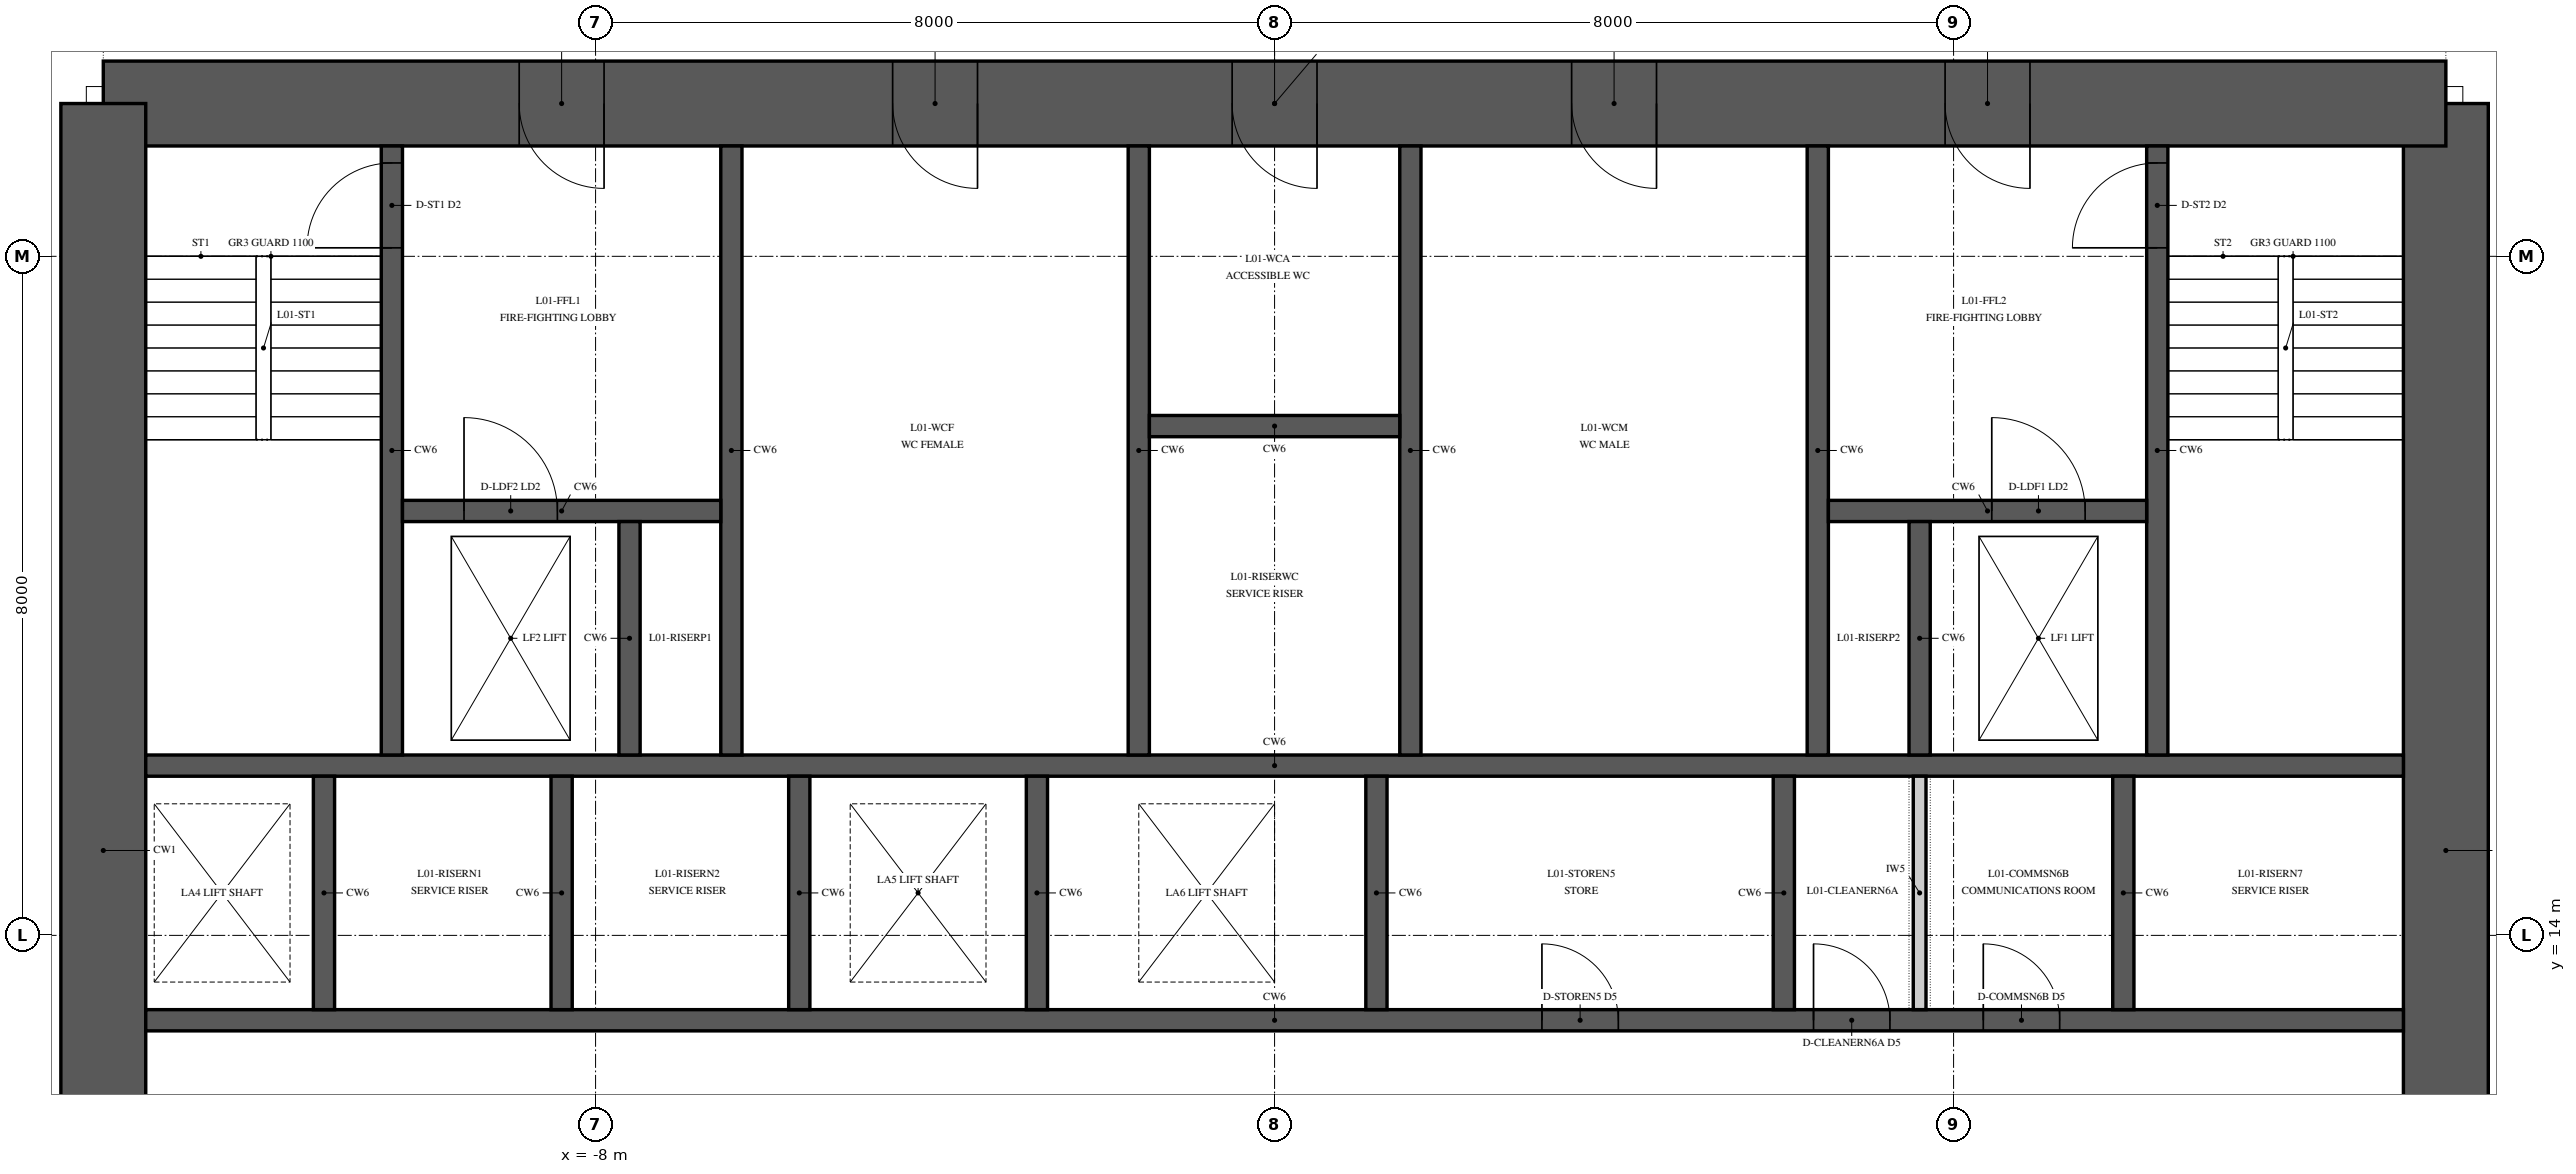
"""IFC4 building model, lengths in metres.
Left out: names, types, materials, properties, quantities, classifications, styles, units other than length and angle.
Written with IfcOpenShell. Run it as: python <this file> out.ifc"""

import sys

from ifc_helpers import new_model, si_unit, direction, frame, frame_2d, origin, place, context, subcontext, project, spatial, polyline, rectangle, outline, extrude, element, fill, save


model = new_model("IFC4")
c1 = context("Model", 3, precision=1e-05, world=origin(), true_north=direction((0.0, 1.0)))
c2 = subcontext(c1, "Body", "Model", "MODEL_VIEW")
j1 = project(units=[si_unit("LENGTHUNIT", "METRE"), si_unit("PLANEANGLEUNIT", "RADIAN")], contexts=[c1])
p1 = place(None, origin())
s1 = spatial("IfcSite", under=j1, at=p1, CompositionType="ELEMENT")
p2 = place(p1, origin())
s2 = spatial("IfcBuilding", under=s1, at=p2, CompositionType="ELEMENT")
p3 = place(p2, frame((0.0, 0.0, 6.0)))
s3 = spatial("IfcBuildingStorey", under=s2, at=p3, CompositionType="ELEMENT", Elevation=6.0)
p4 = place(p3, frame((13.8, 6.2, 0.0), z_axis=(0.0, 0.0, 1.0), x_axis=(0.0, 1.0, 0.0)))
e1 = element("IfcWall", 1, at=p4, inside=s3, PredefinedType="SHEAR", context=c2, shape_type="SweptSolid", body=[
    extrude(outline(polyline([(0.0, -0.5), (17.6, -0.5), (17.6, 0.0), (17.1, 0.0), (17.1, 0.5), (0.5, 0.5), (0.5, 0.0), (0.0, 0.0), (0.0, -0.5)])), origin(), (0.0, 0.0, 1.0), 6.0),
])
p5 = place(p4, frame((4.1, 0.0, 0.0)))
e2 = element("IfcOpeningElement", 2, at=p5, cuts=e1, PredefinedType="OPENING", context=c2, shape_type="SweptSolid", body=[
    extrude(rectangle(XDim=1.8, YDim=2.4, at=frame_2d((0.9, 1.2))), frame((0.0, 0.515, 0.0), z_axis=(0.0, -1.0, 0.0), x_axis=(1.0, 0.0, 0.0)), (0.0, 0.0, 1.0), 1.03),
])
p6 = place(p3, frame((13.8, 23.8, 0.0), z_axis=(0.0, 0.0, 1.0), x_axis=(-1.0, 0.0, 0.0)))
e3 = element("IfcWall", 3, at=p6, inside=s3, PredefinedType="SHEAR", context=c2, shape_type="SweptSolid", body=[
    extrude(rectangle(XDim=27.6, YDim=1.0, at=frame_2d((13.8, 0.0))), origin(), (0.0, 0.0, 1.0), 6.0),
])
p7 = place(p6, frame((21.7, 0.0, 0.0)))
e4 = element("IfcOpeningElement", 4, at=p7, cuts=e3, PredefinedType="OPENING", context=c2, shape_type="SweptSolid", body=[
    extrude(rectangle(XDim=1.0, YDim=2.1, at=frame_2d((0.5, 1.05))), frame((0.0, 0.515, 0.0), z_axis=(0.0, -1.0, 0.0), x_axis=(1.0, 0.0, 0.0)), (0.0, 0.0, 1.0), 1.03),
])
p8 = place(p6, frame((4.9, 0.0, 0.0)))
e5 = element("IfcOpeningElement", 5, at=p8, cuts=e3, PredefinedType="OPENING", context=c2, shape_type="SweptSolid", body=[
    extrude(rectangle(XDim=1.0, YDim=2.1, at=frame_2d((0.5, 1.05))), frame((0.0, 0.515, 0.0), z_axis=(0.0, -1.0, 0.0), x_axis=(1.0, 0.0, 0.0)), (0.0, 0.0, 1.0), 1.03),
])
p9 = place(p6, frame((17.3, 0.0, 0.0)))
e6 = element("IfcOpeningElement", 6, at=p9, cuts=e3, PredefinedType="OPENING", context=c2, shape_type="SweptSolid", body=[
    extrude(rectangle(XDim=1.0, YDim=2.1, at=frame_2d((0.5, 1.05))), frame((0.0, 0.515, 0.0), z_axis=(0.0, -1.0, 0.0), x_axis=(1.0, 0.0, 0.0)), (0.0, 0.0, 1.0), 1.03),
])
p10 = place(p6, frame((13.3, 0.0, 0.0)))
e7 = element("IfcOpeningElement", 7, at=p10, cuts=e3, PredefinedType="OPENING", context=c2, shape_type="SweptSolid", body=[
    extrude(rectangle(XDim=1.0, YDim=2.1, at=frame_2d((0.5, 1.05))), frame((0.0, 0.515, 0.0), z_axis=(0.0, -1.0, 0.0), x_axis=(1.0, 0.0, 0.0)), (0.0, 0.0, 1.0), 1.03),
])
p11 = place(p6, frame((9.3, 0.0, 0.0)))
e8 = element("IfcOpeningElement", 8, at=p11, cuts=e3, PredefinedType="OPENING", context=c2, shape_type="SweptSolid", body=[
    extrude(rectangle(XDim=1.0, YDim=2.1, at=frame_2d((0.5, 1.05))), frame((0.0, 0.515, 0.0), z_axis=(0.0, -1.0, 0.0), x_axis=(1.0, 0.0, 0.0)), (0.0, 0.0, 1.0), 1.03),
])
p12 = place(p3, frame((-13.8, 23.8, 0.0), z_axis=(0.0, 0.0, 1.0), x_axis=(0.0, -1.0, 0.0)))
e9 = element("IfcWall", 9, at=p12, inside=s3, PredefinedType="SHEAR", context=c2, shape_type="SweptSolid", body=[
    extrude(outline(polyline([(0.0, -0.5), (17.6, -0.5), (17.6, 0.0), (17.1, 0.0), (17.1, 0.5), (0.5, 0.5), (0.5, 0.0), (0.0, 0.0), (0.0, -0.5)])), origin(), (0.0, 0.0, 1.0), 6.0),
])
p13 = place(p12, frame((11.7, 0.0, 0.0)))
e10 = element("IfcOpeningElement", 10, at=p13, cuts=e9, PredefinedType="OPENING", context=c2, shape_type="SweptSolid", body=[
    extrude(rectangle(XDim=1.8, YDim=2.4, at=frame_2d((0.9, 1.2))), frame((0.0, 0.515, 0.0), z_axis=(0.0, -1.0, 0.0), x_axis=(1.0, 0.0, 0.0)), (0.0, 0.0, 1.0), 1.03),
])
p14 = place(p3, frame((-13.3, 13.0, 0.0), z_axis=(0.0, 0.0, 1.0), x_axis=(1.0, 0.0, 0.0)))
e11 = element("IfcWall", 11, at=p14, inside=s3, PredefinedType="SHEAR", context=c2, shape_type="SweptSolid", body=[
    extrude(rectangle(XDim=26.6, YDim=0.25, at=frame_2d((13.3, 0.0))), origin(), (0.0, 0.0, 1.0), 6.0),
])
p15 = place(p14, frame((16.45, 0.0, 0.0)))
e12 = element("IfcOpeningElement", 12, at=p15, cuts=e11, PredefinedType="OPENING", context=c2, shape_type="SweptSolid", body=[
    extrude(rectangle(XDim=0.9, YDim=2.1, at=frame_2d((0.45, 1.05))), frame((0.0, 0.14, 0.0), z_axis=(0.0, -1.0, 0.0), x_axis=(1.0, 0.0, 0.0)), (0.0, 0.0, 1.0), 0.28),
])
p16 = place(p14, frame((19.65, 0.0, 0.0)))
e13 = element("IfcOpeningElement", 13, at=p16, cuts=e11, PredefinedType="OPENING", context=c2, shape_type="SweptSolid", body=[
    extrude(rectangle(XDim=0.9, YDim=2.1, at=frame_2d((0.45, 1.05))), frame((0.0, 0.14, 0.0), z_axis=(0.0, -1.0, 0.0), x_axis=(1.0, 0.0, 0.0)), (0.0, 0.0, 1.0), 0.28),
])
p17 = place(p14, frame((21.65, 0.0, 0.0)))
e14 = element("IfcOpeningElement", 14, at=p17, cuts=e11, PredefinedType="OPENING", context=c2, shape_type="SweptSolid", body=[
    extrude(rectangle(XDim=0.9, YDim=2.1, at=frame_2d((0.45, 1.05))), frame((0.0, 0.14, 0.0), z_axis=(0.0, -1.0, 0.0), x_axis=(1.0, 0.0, 0.0)), (0.0, 0.0, 1.0), 0.28),
])
p18 = place(p3, frame((-13.3, 16.0, 0.0), z_axis=(0.0, 0.0, 1.0), x_axis=(1.0, 0.0, 0.0)))
e15 = element("IfcWall", 15, at=p18, inside=s3, PredefinedType="SHEAR", context=c2, shape_type="SweptSolid", body=[
    extrude(rectangle(XDim=26.6, YDim=0.25, at=frame_2d((13.3, 0.0))), origin(), (0.0, 0.0, 1.0), 6.0),
])
for number, where, z_axis, x_axis in (
    (16, (-11.2, 13.125, 0.0), (0.0, 0.0, 1.0), (0.0, 1.0, 0.0)),
    (17, (-8.4, 13.125, 0.0), (0.0, 0.0, 1.0), (0.0, 1.0, 0.0)),
    (18, (-5.6, 13.125, 0.0), (0.0, 0.0, 1.0), (0.0, 1.0, 0.0)),
    (19, (-2.8, 13.125, 0.0), (0.0, 0.0, 1.0), (0.0, 1.0, 0.0)),
    (20, (1.2, 13.125, 0.0), (0.0, 0.0, 1.0), (0.0, 1.0, 0.0)),
    (21, (6.0, 13.125, 0.0), (0.0, 0.0, 1.0), (0.0, 1.0, 0.0)),
    (22, (10.0, 13.125, 0.0), (0.0, 0.0, 1.0), (0.0, 1.0, 0.0)),
):
    element("IfcWall", number, at=place(p3, frame(where, z_axis=z_axis, x_axis=x_axis)), inside=s3, PredefinedType="SHEAR", context=c2, shape_type="SweptSolid", body=[
        extrude(rectangle(XDim=2.75, YDim=0.25, at=frame_2d((1.375, 0.0))), origin(), (0.0, 0.0, 1.0), 6.0),
    ])
p19 = place(p3, frame((-10.4, 16.125, 0.0), z_axis=(0.0, 0.0, 1.0), x_axis=(0.0, 1.0, 0.0)))
e23 = element("IfcWall", 23, at=p19, inside=s3, PredefinedType="SHEAR", context=c2, shape_type="SweptSolid", body=[
    extrude(rectangle(XDim=7.175, YDim=0.25, at=frame_2d((3.587, 0.0))), origin(), (0.0, 0.0, 1.0), 6.0),
])
p20 = place(p19, frame((5.975, 0.0, 0.0)))
e24 = element("IfcOpeningElement", 24, at=p20, cuts=e23, PredefinedType="OPENING", context=c2, shape_type="SweptSolid", body=[
    extrude(rectangle(XDim=1.0, YDim=2.1, at=frame_2d((0.5, 1.05))), frame((0.0, 0.14, 0.0), z_axis=(0.0, -1.0, 0.0), x_axis=(1.0, 0.0, 0.0)), (0.0, 0.0, 1.0), 0.28),
])
for number, where, z_axis, x_axis in (
    (25, (-6.4, 16.125, 0.0), (0.0, 0.0, 1.0), (0.0, 1.0, 0.0)),
    (26, (-1.6, 16.125, 0.0), (0.0, 0.0, 1.0), (0.0, 1.0, 0.0)),
    (27, (1.6, 16.125, 0.0), (0.0, 0.0, 1.0), (0.0, 1.0, 0.0)),
    (28, (6.4, 16.125, 0.0), (0.0, 0.0, 1.0), (0.0, 1.0, 0.0)),
):
    element("IfcWall", number, at=place(p3, frame(where, z_axis=z_axis, x_axis=x_axis)), inside=s3, PredefinedType="SHEAR", context=c2, shape_type="SweptSolid", body=[
        extrude(rectangle(XDim=7.175, YDim=0.25, at=frame_2d((3.587, 0.0))), origin(), (0.0, 0.0, 1.0), 6.0),
    ])
p21 = place(p3, frame((10.4, 16.125, 0.0), z_axis=(0.0, 0.0, 1.0), x_axis=(0.0, 1.0, 0.0)))
e29 = element("IfcWall", 29, at=p21, inside=s3, PredefinedType="SHEAR", context=c2, shape_type="SweptSolid", body=[
    extrude(rectangle(XDim=7.175, YDim=0.25, at=frame_2d((3.587, 0.0))), origin(), (0.0, 0.0, 1.0), 6.0),
])
p22 = place(p21, frame((5.975, 0.0, 0.0)))
e30 = element("IfcOpeningElement", 30, at=p22, cuts=e29, PredefinedType="OPENING", context=c2, shape_type="SweptSolid", body=[
    extrude(rectangle(XDim=1.0, YDim=2.1, at=frame_2d((0.5, 1.05))), frame((0.0, 0.14, 0.0), z_axis=(0.0, -1.0, 0.0), x_axis=(1.0, 0.0, 0.0)), (0.0, 0.0, 1.0), 0.28),
])
p23 = place(p3, frame((-10.275, 19.0, 0.0), z_axis=(0.0, 0.0, 1.0), x_axis=(1.0, 0.0, 0.0)))
e31 = element("IfcWall", 31, at=p23, inside=s3, PredefinedType="SHEAR", context=c2, shape_type="SweptSolid", body=[
    extrude(rectangle(XDim=3.75, YDim=0.25, at=frame_2d((1.875, 0.0))), origin(), (0.0, 0.0, 1.0), 6.0),
])
p24 = place(p23, frame((0.725, 0.0, 0.0)))
e32 = element("IfcOpeningElement", 32, at=p24, cuts=e31, PredefinedType="OPENING", context=c2, shape_type="SweptSolid", body=[
    extrude(rectangle(XDim=1.1, YDim=2.1, at=frame_2d((0.55, 1.05))), frame((0.0, 0.14, 0.0), z_axis=(0.0, -1.0, 0.0), x_axis=(1.0, 0.0, 0.0)), (0.0, 0.0, 1.0), 0.28),
])
p25 = place(p3, frame((6.525, 19.0, 0.0), z_axis=(0.0, 0.0, 1.0), x_axis=(1.0, 0.0, 0.0)))
e33 = element("IfcWall", 33, at=p25, inside=s3, PredefinedType="SHEAR", context=c2, shape_type="SweptSolid", body=[
    extrude(rectangle(XDim=3.75, YDim=0.25, at=frame_2d((1.875, 0.0))), origin(), (0.0, 0.0, 1.0), 6.0),
])
p26 = place(p25, frame((1.925, 0.0, 0.0)))
e34 = element("IfcOpeningElement", 34, at=p26, cuts=e33, PredefinedType="OPENING", context=c2, shape_type="SweptSolid", body=[
    extrude(rectangle(XDim=1.1, YDim=2.1, at=frame_2d((0.55, 1.05))), frame((0.0, 0.14, 0.0), z_axis=(0.0, -1.0, 0.0), x_axis=(1.0, 0.0, 0.0)), (0.0, 0.0, 1.0), 0.28),
])
for number, where, z_axis, x_axis in (
    (35, (-7.6, 16.125, 0.0), (0.0, 0.0, 1.0), (0.0, 1.0, 0.0)),
    (36, (7.6, 16.125, 0.0), (0.0, 0.0, 1.0), (0.0, 1.0, 0.0)),
):
    element("IfcWall", number, at=place(p3, frame(where, z_axis=z_axis, x_axis=x_axis)), inside=s3, PredefinedType="SHEAR", context=c2, shape_type="SweptSolid", body=[
        extrude(rectangle(XDim=2.75, YDim=0.25, at=frame_2d((1.375, 0.0))), origin(), (0.0, 0.0, 1.0), 6.0),
    ])
p27 = place(p3, frame((-1.475, 20.0, 0.0), z_axis=(0.0, 0.0, 1.0), x_axis=(1.0, 0.0, 0.0)))
e37 = element("IfcWall", 37, at=p27, inside=s3, PredefinedType="SHEAR", context=c2, shape_type="SweptSolid", body=[
    extrude(rectangle(XDim=2.95, YDim=0.25, at=frame_2d((1.475, 0.0))), origin(), (0.0, 0.0, 1.0), 6.0),
])
p28 = place(p3, frame((7.6, 13.125, 0.0), z_axis=(0.0, 0.0, 1.0), x_axis=(0.0, 1.0, 0.0)))
e38 = element("IfcWall", 38, at=p28, inside=s3, PredefinedType="PARTITIONING", context=c2, shape_type="SweptSolid", body=[
    extrude(rectangle(XDim=2.75, YDim=0.15, at=frame_2d((1.375, 0.0))), origin(), (0.0, 0.0, 1.0), 5.85),
])
p29 = place(p7, origin())
e39 = element("IfcDoor", 39, at=p29, inside=s3, OperationType="SINGLE_SWING_RIGHT", PredefinedType="DOOR", context=c2, shape_type="SweptSolid", body=[
    extrude(rectangle(XDim=1.0, YDim=2.1, at=frame_2d((0.5, 1.05))), frame((0.0, 0.5, 0.0), z_axis=(0.0, -1.0, 0.0), x_axis=(1.0, 0.0, 0.0)), (0.0, 0.0, 1.0), 1.0),
])
fill(e4, e39)
p30 = place(p8, origin())
e40 = element("IfcDoor", 40, at=p30, inside=s3, OperationType="SINGLE_SWING_RIGHT", PredefinedType="DOOR", context=c2, shape_type="SweptSolid", body=[
    extrude(rectangle(XDim=1.0, YDim=2.1, at=frame_2d((0.5, 1.05))), frame((0.0, 0.5, 0.0), z_axis=(0.0, -1.0, 0.0), x_axis=(1.0, 0.0, 0.0)), (0.0, 0.0, 1.0), 1.0),
])
fill(e5, e40)
p31 = place(p9, origin())
e41 = element("IfcDoor", 41, at=p31, inside=s3, OperationType="SINGLE_SWING_LEFT", PredefinedType="DOOR", context=c2, shape_type="SweptSolid", body=[
    extrude(rectangle(XDim=1.0, YDim=2.1, at=frame_2d((0.5, 1.05))), frame((0.0, 0.5, 0.0), z_axis=(0.0, -1.0, 0.0), x_axis=(1.0, 0.0, 0.0)), (0.0, 0.0, 1.0), 1.0),
])
fill(e6, e41)
p32 = place(p10, origin())
e42 = element("IfcDoor", 42, at=p32, inside=s3, OperationType="SINGLE_SWING_LEFT", PredefinedType="DOOR", context=c2, shape_type="SweptSolid", body=[
    extrude(rectangle(XDim=1.0, YDim=2.1, at=frame_2d((0.5, 1.05))), frame((0.0, 0.5, 0.0), z_axis=(0.0, -1.0, 0.0), x_axis=(1.0, 0.0, 0.0)), (0.0, 0.0, 1.0), 1.0),
])
fill(e7, e42)
p33 = place(p11, origin())
e43 = element("IfcDoor", 43, at=p33, inside=s3, OperationType="SINGLE_SWING_LEFT", PredefinedType="DOOR", context=c2, shape_type="SweptSolid", body=[
    extrude(rectangle(XDim=1.0, YDim=2.1, at=frame_2d((0.5, 1.05))), frame((0.0, 0.5, 0.0), z_axis=(0.0, -1.0, 0.0), x_axis=(1.0, 0.0, 0.0)), (0.0, 0.0, 1.0), 1.0),
])
fill(e8, e43)
p34 = place(p20, origin())
e44 = element("IfcDoor", 44, at=p34, inside=s3, OperationType="SINGLE_SWING_LEFT", PredefinedType="DOOR", context=c2, shape_type="SweptSolid", body=[
    extrude(rectangle(XDim=1.0, YDim=2.1, at=frame_2d((0.5, 1.05))), frame((0.0, 0.125, 0.0), z_axis=(0.0, -1.0, 0.0), x_axis=(1.0, 0.0, 0.0)), (0.0, 0.0, 1.0), 0.25),
])
fill(e24, e44)
p35 = place(p22, origin())
e45 = element("IfcDoor", 45, at=p35, inside=s3, OperationType="SINGLE_SWING_LEFT", PredefinedType="DOOR", context=c2, shape_type="SweptSolid", body=[
    extrude(rectangle(XDim=1.0, YDim=2.1, at=frame_2d((0.5, 1.05))), frame((0.0, 0.125, 0.0), z_axis=(0.0, -1.0, 0.0), x_axis=(1.0, 0.0, 0.0)), (0.0, 0.0, 1.0), 0.25),
])
fill(e30, e45)
p36 = place(p26, origin())
e46 = element("IfcDoor", 46, at=p36, inside=s3, OperationType="SLIDING_TO_RIGHT", PredefinedType="DOOR", context=c2, shape_type="SweptSolid", body=[
    extrude(rectangle(XDim=1.1, YDim=2.1, at=frame_2d((0.55, 1.05))), frame((0.0, 0.125, 0.0), z_axis=(0.0, -1.0, 0.0), x_axis=(1.0, 0.0, 0.0)), (0.0, 0.0, 1.0), 0.25),
])
fill(e34, e46)
p37 = place(p24, origin())
e47 = element("IfcDoor", 47, at=p37, inside=s3, OperationType="SLIDING_TO_RIGHT", PredefinedType="DOOR", context=c2, shape_type="SweptSolid", body=[
    extrude(rectangle(XDim=1.1, YDim=2.1, at=frame_2d((0.55, 1.05))), frame((0.0, 0.125, 0.0), z_axis=(0.0, -1.0, 0.0), x_axis=(1.0, 0.0, 0.0)), (0.0, 0.0, 1.0), 0.25),
])
fill(e32, e47)
p38 = place(p15, origin())
e48 = element("IfcDoor", 48, at=p38, inside=s3, OperationType="SINGLE_SWING_LEFT", PredefinedType="DOOR", context=c2, shape_type="SweptSolid", body=[
    extrude(rectangle(XDim=0.9, YDim=2.1, at=frame_2d((0.45, 1.05))), frame((0.0, 0.125, 0.0), z_axis=(0.0, -1.0, 0.0), x_axis=(1.0, 0.0, 0.0)), (0.0, 0.0, 1.0), 0.25),
])
fill(e12, e48)
p39 = place(p16, origin())
e49 = element("IfcDoor", 49, at=p39, inside=s3, OperationType="SINGLE_SWING_LEFT", PredefinedType="DOOR", context=c2, shape_type="SweptSolid", body=[
    extrude(rectangle(XDim=0.9, YDim=2.1, at=frame_2d((0.45, 1.05))), frame((0.0, 0.125, 0.0), z_axis=(0.0, -1.0, 0.0), x_axis=(1.0, 0.0, 0.0)), (0.0, 0.0, 1.0), 0.25),
])
fill(e13, e49)
p40 = place(p17, origin())
e50 = element("IfcDoor", 50, at=p40, inside=s3, OperationType="SINGLE_SWING_LEFT", PredefinedType="DOOR", context=c2, shape_type="SweptSolid", body=[
    extrude(rectangle(XDim=0.9, YDim=2.1, at=frame_2d((0.45, 1.05))), frame((0.0, 0.125, 0.0), z_axis=(0.0, -1.0, 0.0), x_axis=(1.0, 0.0, 0.0)), (0.0, 0.0, 1.0), 0.25),
])
fill(e14, e50)
save(model, sys.argv[1])
